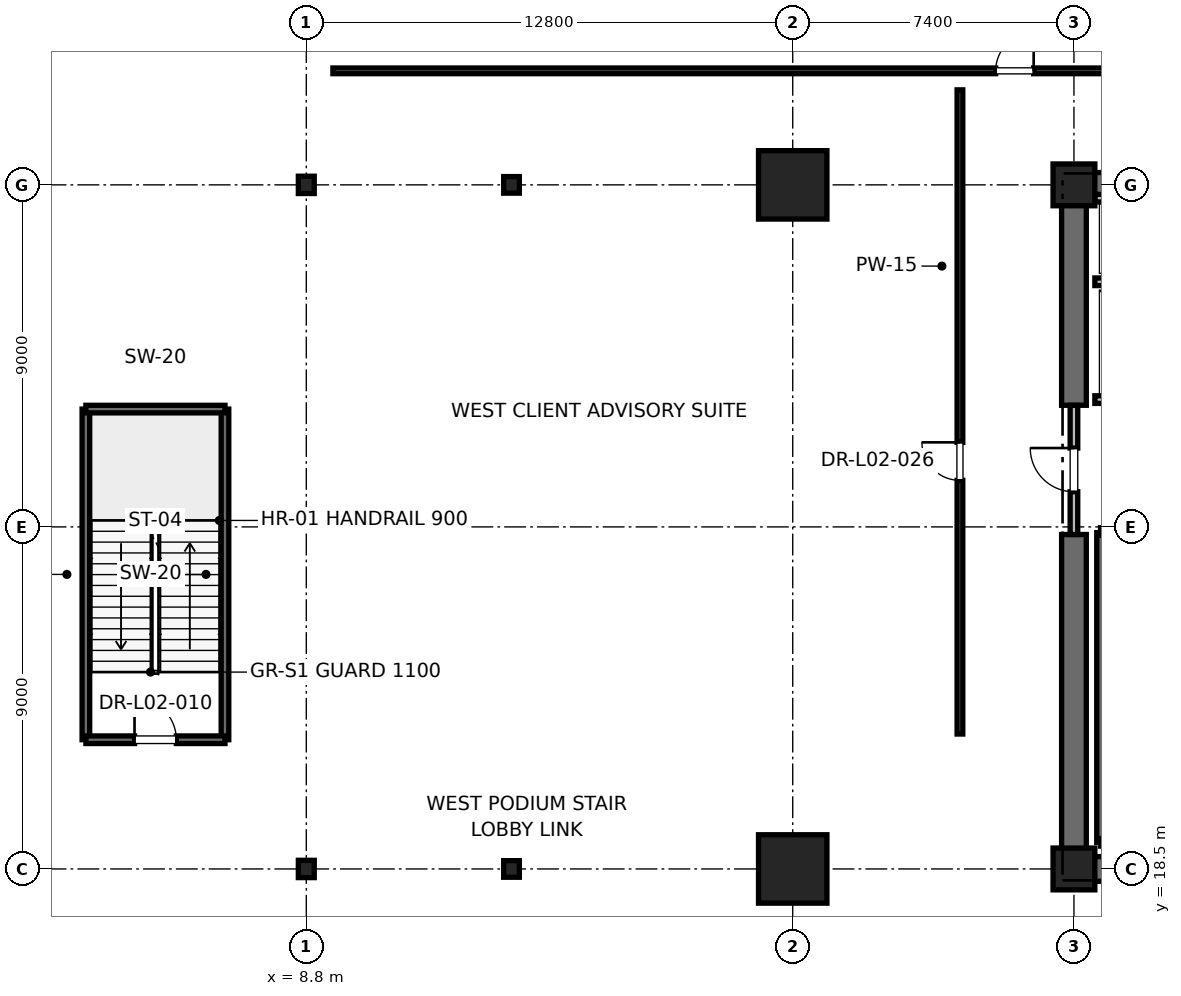
"""IFC4 building model, lengths in metres.
Left out: names, types, materials, properties, quantities, classifications, styles, units other than length and angle.
Written with IfcOpenShell. Run it as: python <this file> out.ifc"""

import sys

from ifc_helpers import new_model, si_unit, direction, frame, frame_2d, origin, origin_2d, place, context, subcontext, project, spatial, rectangle, i_section, extrude, element, fill, save


model = new_model("IFC4")
c1 = context("Model", 3, precision=1e-05, world=origin(), true_north=direction((0.0, 1.0)))
c2 = subcontext(c1, "Body", "Model", "MODEL_VIEW")
j1 = project(units=[si_unit("LENGTHUNIT", "METRE"), si_unit("PLANEANGLEUNIT", "RADIAN")], contexts=[c1])
p1 = place(None, origin())
s1 = spatial("IfcSite", under=j1, at=p1, CompositionType="ELEMENT")
p2 = place(p1, origin())
s2 = spatial("IfcBuilding", under=s1, at=p2, CompositionType="ELEMENT")
p3 = place(p2, frame((0.0, 0.0, 11.2)))
s3 = spatial("IfcBuildingStorey", under=s2, at=p3, CompositionType="ELEMENT", Elevation=11.2)
for number, where, z_axis, x_axis in (
    (1, (21.6, 18.5, 0.0), (0.0, 0.0, 1.0), (1.0, 0.0, 0.0)),
    (2, (21.6, 36.5, 0.0), (0.0, 0.0, 1.0), (1.0, 0.0, 0.0)),
):
    element("IfcColumn", number, at=place(p3, frame(where, z_axis=z_axis, x_axis=x_axis)), inside=s3, PredefinedType="COLUMN", context=c2, shape_type="SweptSolid", body=[
        extrude(rectangle(XDim=1.8, YDim=1.8, at=origin_2d()), origin(), (0.0, 0.0, 1.0), 5.2),
    ])
for number, where, z_axis, x_axis in (
    (3, (14.2, 18.5, 0.0), (0.0, 0.0, 1.0), (1.0, 0.0, 0.0)),
    (4, (14.2, 36.5, 0.0), (0.0, 0.0, 1.0), (1.0, 0.0, 0.0)),
):
    element("IfcColumn", number, at=place(p3, frame(where, z_axis=z_axis, x_axis=x_axis)), inside=s3, PredefinedType="COLUMN", context=c2, shape_type="SweptSolid", body=[
        extrude(i_section(OverallWidth=0.412, OverallDepth=0.437, WebThickness=0.036, FlangeThickness=0.058, FilletRadius=0.015, at=origin_2d()), origin(), (0.0, 0.0, 1.0), 5.2),
    ])
for number, where, z_axis, x_axis in (
    (5, (29.0, 18.5, 0.0), (0.0, 0.0, 1.0), (1.0, 0.0, 0.0)),
    (6, (29.0, 36.5, 0.0), (0.0, 0.0, 1.0), (1.0, 0.0, 0.0)),
):
    element("IfcColumn", number, at=place(p3, frame(where, z_axis=z_axis, x_axis=x_axis)), inside=s3, PredefinedType="PILASTER", context=c2, shape_type="SweptSolid", body=[
        extrude(rectangle(XDim=1.1, YDim=1.1, at=origin_2d()), origin(), (0.0, 0.0, 1.0), 5.2),
    ])
for number, where, z_axis, x_axis in (
    (7, (8.8, 18.5, 0.0), (0.0, 0.0, 1.0), (1.0, 0.0, 0.0)),
    (8, (8.8, 36.5, 0.0), (0.0, 0.0, 1.0), (1.0, 0.0, 0.0)),
):
    element("IfcColumn", number, at=place(p3, frame(where, z_axis=z_axis, x_axis=x_axis)), inside=s3, PredefinedType="COLUMN", context=c2, shape_type="SweptSolid", body=[
        extrude(i_section(OverallWidth=0.418, OverallDepth=0.456, WebThickness=0.042, FlangeThickness=0.067, FilletRadius=0.015, at=origin_2d()), origin(), (0.0, 0.0, 1.0), 5.2),
    ])
p4 = place(p3, frame((29.0, 18.5, 0.0), z_axis=(0.0, 0.0, 1.0), x_axis=(1.0, 0.0, 0.0)))
e9 = element("IfcWall", 9, at=p4, inside=s3, PredefinedType="SHEAR", context=c2, shape_type="SweptSolid", body=[
    extrude(rectangle(XDim=9.2, YDim=0.65, at=frame_2d((4.6, 0.0))), origin(), (0.0, 0.0, 1.0), 4.92),
])
p5 = place(p3, frame((29.0, 36.5, 0.0), z_axis=(0.0, 0.0, 1.0), x_axis=(1.0, 0.0, 0.0)))
e10 = element("IfcWall", 10, at=p5, inside=s3, PredefinedType="SHEAR", context=c2, shape_type="SweptSolid", body=[
    extrude(rectangle(XDim=5.8, YDim=0.65, at=frame_2d((2.9, 0.0))), origin(), (0.0, 0.0, 1.0), 4.92),
])
p6 = place(p3, frame((29.0, 18.5, 0.0), z_axis=(0.0, 0.0, 1.0), x_axis=(0.0, 1.0, 0.0)))
e11 = element("IfcWall", 11, at=p6, inside=s3, PredefinedType="SHEAR", context=c2, shape_type="SweptSolid", body=[
    extrude(rectangle(XDim=8.8, YDim=0.65, at=frame_2d((4.4, 0.0))), origin(), (0.0, 0.0, 1.0), 4.92),
])
p7 = place(p3, frame((29.0, 30.7, 0.0), z_axis=(0.0, 0.0, 1.0), x_axis=(0.0, 1.0, 0.0)))
e12 = element("IfcWall", 12, at=p7, inside=s3, PredefinedType="SHEAR", context=c2, shape_type="SweptSolid", body=[
    extrude(rectangle(XDim=5.8, YDim=0.65, at=frame_2d((2.9, 0.0))), origin(), (0.0, 0.0, 1.0), 4.92),
])
p8 = place(p3, frame((29.7, 19.2, 0.0), z_axis=(0.0, 0.0, 1.0), x_axis=(0.0, 1.0, 0.0)))
e13 = element("IfcWall", 13, at=p8, inside=s3, PredefinedType="SOLIDWALL", context=c2, shape_type="SweptSolid", body=[
    extrude(rectangle(XDim=8.15, YDim=0.2, at=frame_2d((4.075, 0.0))), origin(), (0.0, 0.0, 1.0), 4.92),
])
for number, where, z_axis, x_axis in (
    (14, (3.0, 21.9, 0.0), (0.0, 0.0, 1.0), (0.0, 1.0, 0.0)),
    (15, (6.66, 21.9, 0.0), (0.0, 0.0, 1.0), (0.0, 1.0, 0.0)),
):
    element("IfcWall", number, at=place(p3, frame(where, z_axis=z_axis, x_axis=x_axis)), inside=s3, PredefinedType="SOLIDWALL", context=c2, shape_type="SweptSolid", body=[
        extrude(rectangle(XDim=8.7, YDim=0.2, at=frame_2d((4.35, 0.0))), origin(), (0.0, 0.0, 1.0), 4.92),
    ])
p9 = place(p3, frame((3.0, 30.6, 0.0), z_axis=(0.0, 0.0, 1.0), x_axis=(1.0, 0.0, 0.0)))
e16 = element("IfcWall", 16, at=p9, inside=s3, PredefinedType="SOLIDWALL", context=c2, shape_type="SweptSolid", body=[
    extrude(rectangle(XDim=3.66, YDim=0.2, at=frame_2d((1.83, 0.0))), origin(), (0.0, 0.0, 1.0), 4.92),
])
p10 = place(p3, frame((3.0, 21.9, 0.0), z_axis=(0.0, 0.0, 1.0), x_axis=(1.0, 0.0, 0.0)))
e17 = element("IfcWall", 17, at=p10, inside=s3, PredefinedType="SOLIDWALL", context=c2, shape_type="SweptSolid", body=[
    extrude(rectangle(XDim=3.66, YDim=0.2, at=frame_2d((1.83, 0.0))), origin(), (0.0, 0.0, 1.0), 4.92),
])
p11 = place(p10, frame((1.28, 0.0, 0.0)))
e18 = element("IfcOpeningElement", 18, at=p11, cuts=e17, PredefinedType="OPENING", context=c2, shape_type="SweptSolid", body=[
    extrude(rectangle(XDim=1.1, YDim=2.15, at=frame_2d((0.55, 1.075))), frame((0.0, 0.1, 0.0), z_axis=(0.0, -1.0, 0.0), x_axis=(1.0, 0.0, 0.0)), (0.0, 0.0, 1.0), 0.2),
])
p12 = place(p3, frame((29.0, 27.3, 0.0), z_axis=(0.0, 0.0, 1.0), x_axis=(0.0, 1.0, 0.0)))
e19 = element("IfcWall", 19, at=p12, inside=s3, PredefinedType="PARTITIONING", context=c2, shape_type="SweptSolid", body=[
    extrude(rectangle(XDim=3.4, YDim=0.2, at=frame_2d((1.7, 0.0))), origin(), (0.0, 0.0, 1.0), 3.7),
])
p13 = place(p12, frame((1.125, 0.0, 0.0)))
e20 = element("IfcOpeningElement", 20, at=p13, cuts=e19, PredefinedType="OPENING", context=c2, shape_type="SweptSolid", body=[
    extrude(rectangle(XDim=1.15, YDim=2.2, at=frame_2d((0.575, 1.1))), frame((0.0, 0.1, 0.0), z_axis=(0.0, -1.0, 0.0), x_axis=(1.0, 0.0, 0.0)), (0.0, 0.0, 1.0), 0.2),
])
p14 = place(p3, frame((29.55, 30.85, 0.0), z_axis=(0.0, 0.0, 1.0), x_axis=(1.0, 0.0, 0.0)))
e21 = element("IfcWall", 21, at=p14, inside=s3, PredefinedType="SOLIDWALL", context=c2, shape_type="SweptSolid", body=[
    extrude(rectangle(XDim=2.6, YDim=0.2, at=frame_2d((1.3, 0.0))), origin(), (0.0, 0.0, 1.0), 3.7),
])
p15 = place(p14, frame((0.75, 0.0, 0.0)))
e22 = element("IfcOpeningElement", 22, at=p15, cuts=e21, PredefinedType="OPENING", context=c2, shape_type="SweptSolid", body=[
    extrude(rectangle(XDim=1.1, YDim=2.2, at=frame_2d((0.55, 1.1))), frame((0.0, 0.1, 0.0), z_axis=(0.0, -1.0, 0.0), x_axis=(1.0, 0.0, 0.0)), (0.0, 0.0, 1.0), 0.2),
])
p16 = place(p3, frame((29.55, 33.95, 0.0), z_axis=(0.0, 0.0, 1.0), x_axis=(1.0, 0.0, 0.0)))
e23 = element("IfcWall", 23, at=p16, inside=s3, PredefinedType="SOLIDWALL", context=c2, shape_type="SweptSolid", body=[
    extrude(rectangle(XDim=2.8, YDim=0.2, at=frame_2d((1.4, 0.0))), origin(), (0.0, 0.0, 1.0), 4.92),
])
p17 = place(p3, frame((32.35, 36.15, 0.0), z_axis=(0.0, 0.0, 1.0), x_axis=(-1.0, 0.0, 0.0)))
e24 = element("IfcWall", 24, at=p17, inside=s3, PredefinedType="SOLIDWALL", context=c2, shape_type="SweptSolid", body=[
    extrude(rectangle(XDim=2.8, YDim=0.2, at=frame_2d((1.4, 0.0))), origin(), (0.0, 0.0, 1.0), 3.979),
])
p18 = place(p3, frame((9.5, 39.5, 0.0), z_axis=(0.0, 0.0, 1.0), x_axis=(1.0, 0.0, 0.0)))
e25 = element("IfcWall", 25, at=p18, inside=s3, PredefinedType="PARTITIONING", context=c2, shape_type="SweptSolid", body=[
    extrude(rectangle(XDim=35.95, YDim=0.15, at=frame_2d((17.975, 0.0))), origin(), (0.0, 0.0, 1.0), 2.85),
])
p19 = place(p18, frame((17.44, 0.0, 0.0)))
e26 = element("IfcOpeningElement", 26, at=p19, cuts=e25, PredefinedType="OPENING", context=c2, shape_type="SweptSolid", body=[
    extrude(rectangle(XDim=1.0, YDim=2.15, at=frame_2d((0.5, 1.075))), frame((0.0, 0.075, 0.0), z_axis=(0.0, -1.0, 0.0), x_axis=(1.0, 0.0, 0.0)), (0.0, 0.0, 1.0), 0.15),
])
p20 = place(p3, frame((26.0, 22.05, 0.0), z_axis=(0.0, 0.0, 1.0), x_axis=(0.0, 1.0, 0.0)))
e27 = element("IfcWall", 27, at=p20, inside=s3, PredefinedType="PARTITIONING", context=c2, shape_type="SweptSolid", body=[
    extrude(rectangle(XDim=16.95, YDim=0.15, at=frame_2d((8.475, 0.0))), origin(), (0.0, 0.0, 1.0), 2.85),
])
p21 = place(p20, frame((6.675, 0.0, 0.0)))
e28 = element("IfcOpeningElement", 28, at=p21, cuts=e27, PredefinedType="OPENING", context=c2, shape_type="SweptSolid", body=[
    extrude(rectangle(XDim=1.0, YDim=2.15, at=frame_2d((0.5, 1.075))), frame((0.0, 0.075, 0.0), z_axis=(0.0, -1.0, 0.0), x_axis=(1.0, 0.0, 0.0)), (0.0, 0.0, 1.0), 0.15),
])
p22 = place(p11, origin())
e29 = element("IfcDoor", 29, at=p22, inside=s3, OperationType="SINGLE_SWING_LEFT", PredefinedType="DOOR", context=c2, shape_type="SweptSolid", body=[
    extrude(rectangle(XDim=1.1, YDim=2.15, at=frame_2d((0.55, 1.075))), frame((0.0, 0.025, 0.0), z_axis=(0.0, -1.0, 0.0), x_axis=(1.0, 0.0, 0.0)), (0.0, 0.0, 1.0), 0.05),
])
fill(e18, e29)
p23 = place(p13, origin())
e30 = element("IfcDoor", 30, at=p23, inside=s3, OperationType="SINGLE_SWING_RIGHT", PredefinedType="DOOR", context=c2, shape_type="SweptSolid", body=[
    extrude(rectangle(XDim=1.15, YDim=2.2, at=frame_2d((0.575, 1.1))), frame((0.0, 0.025, 0.0), z_axis=(0.0, -1.0, 0.0), x_axis=(1.0, 0.0, 0.0)), (0.0, 0.0, 1.0), 0.05),
])
fill(e20, e30)
p24 = place(p19, origin())
e31 = element("IfcDoor", 31, at=p24, inside=s3, OperationType="SINGLE_SWING_RIGHT", PredefinedType="DOOR", context=c2, shape_type="SweptSolid", body=[
    extrude(rectangle(XDim=1.0, YDim=2.15, at=frame_2d((0.5, 1.075))), frame((0.0, 0.025, 0.0), z_axis=(0.0, -1.0, 0.0), x_axis=(1.0, 0.0, 0.0)), (0.0, 0.0, 1.0), 0.05),
])
fill(e26, e31)
p25 = place(p21, origin())
e32 = element("IfcDoor", 32, at=p25, inside=s3, OperationType="SINGLE_SWING_RIGHT", PredefinedType="DOOR", context=c2, shape_type="SweptSolid", body=[
    extrude(rectangle(XDim=1.0, YDim=2.15, at=frame_2d((0.5, 1.075))), frame((0.0, 0.025, 0.0), z_axis=(0.0, -1.0, 0.0), x_axis=(1.0, 0.0, 0.0)), (0.0, 0.0, 1.0), 0.05),
])
fill(e28, e32)
save(model, sys.argv[1])
